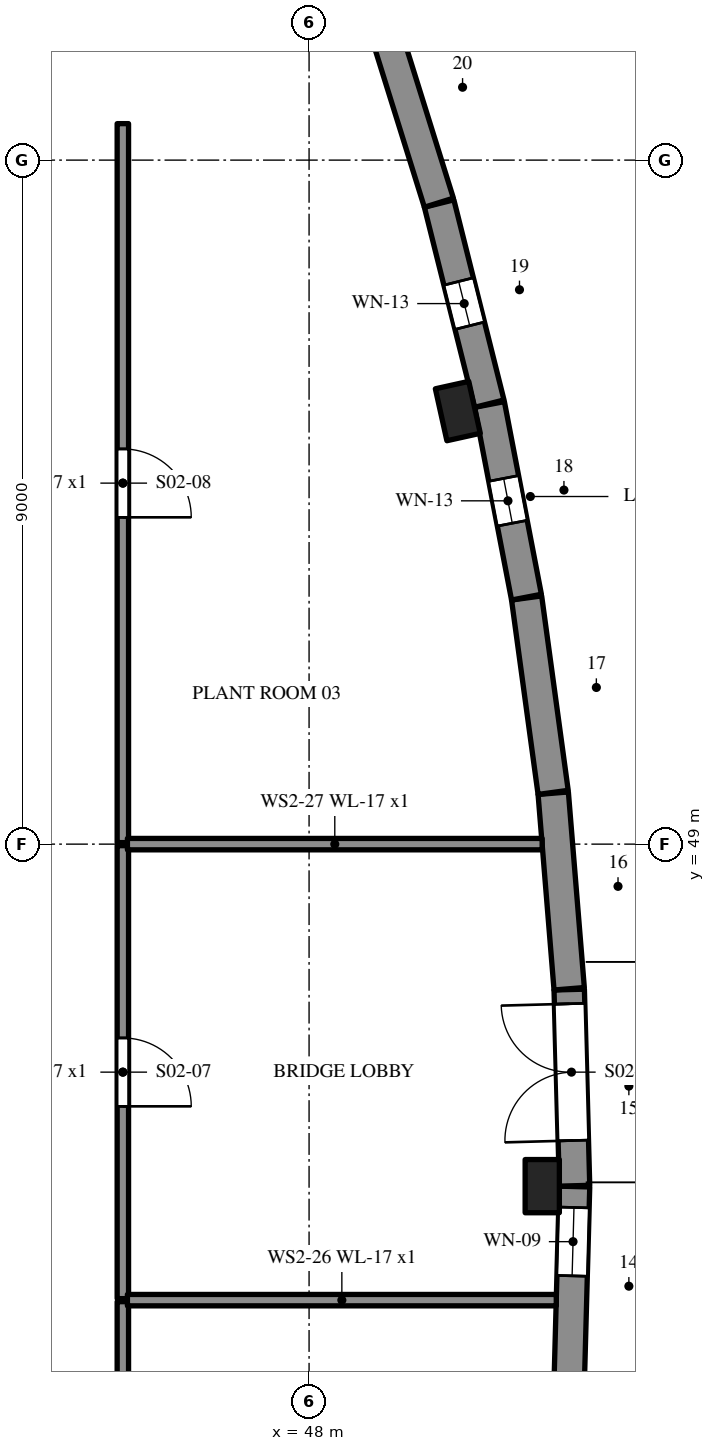
"""IFC4 building model, lengths in metres.
Left out: names, types, materials, properties, quantities, classifications, styles, units other than length and angle.
Written with IfcOpenShell. Run it as: python <this file> out.ifc"""

import sys

from ifc_helpers import new_model, si_unit, direction, frame, frame_2d, origin, origin_2d, place, context, subcontext, project, spatial, polyline, rectangle, outline, extrude, element, fill, save


model = new_model("IFC4")
c1 = context("Model", 3, precision=1e-05, world=origin(), true_north=direction((0.0, 1.0)))
c2 = subcontext(c1, "Body", "Model", "MODEL_VIEW")
j1 = project(units=[si_unit("LENGTHUNIT", "METRE"), si_unit("PLANEANGLEUNIT", "RADIAN")], contexts=[c1])
p1 = place(None, origin())
s1 = spatial("IfcSite", under=j1, at=p1, CompositionType="ELEMENT")
p2 = place(p1, origin())
s2 = spatial("IfcBuilding", under=s1, at=p2, CompositionType="ELEMENT")
p3 = place(p2, frame((0.0, 0.0, 10.2)))
s3 = spatial("IfcBuildingStorey", under=s2, at=p3, CompositionType="ELEMENT", Elevation=10.2)
p4 = place(p3, frame((51.423, 41.914, 0.0), z_axis=(0.0, 0.0, 1.0), x_axis=(0.027139748682, 0.99963164918, 0.0)))
e1 = element("IfcWall", 1, at=p4, inside=s3, PredefinedType="SOLIDWALL", context=c2, shape_type="SweptSolid", body=[
    extrude(outline(polyline([(0.0, 0.0), (2.582, 0.0), (2.582, 3.866), (2.517, 3.843), (0.0, 2.97), (0.0, 0.0)])), frame((0.0, 0.2, 0.0), z_axis=(0.0, -1.0, 0.0), x_axis=(1.0, 0.0, 0.0)), (0.0, 0.0, 1.0), 0.4),
])
p5 = place(p4, frame((1.406, 0.0, 0.9)))
e2 = element("IfcOpeningElement", 2, at=p5, cuts=e1, PredefinedType="OPENING", context=c2, shape_type="SweptSolid", body=[
    extrude(rectangle(XDim=0.9, YDim=1.5, at=frame_2d((0.45, 0.75))), frame((0.0, 0.21, 0.0), z_axis=(0.0, -1.0, 0.0), x_axis=(1.0, 0.0, 0.0)), (0.0, 0.0, 1.0), 0.42),
])
p6 = place(p3, frame((51.493, 44.505, 0.0), z_axis=(0.0, 0.0, 1.0), x_axis=(-0.027139748682, 0.99963164918, 0.0)))
e3 = element("IfcWall", 3, at=p6, inside=s3, PredefinedType="SOLIDWALL", context=c2, shape_type="SweptSolid", body=[
    extrude(outline(polyline([(0.0, 0.0), (2.582, 0.0), (2.582, 2.97), (2.559, 2.978), (0.054, 3.847), (0.0, 3.866), (0.0, 0.0)])), frame((0.0, 0.2, 0.0), z_axis=(0.0, -1.0, 0.0), x_axis=(1.0, 0.0, 0.0)), (0.0, 0.0, 1.0), 0.4),
])
p7 = place(p6, frame((0.595, 0.0, 0.0)))
e4 = element("IfcOpeningElement", 4, at=p7, cuts=e3, PredefinedType="OPENING", context=c2, shape_type="SweptSolid", body=[
    extrude(rectangle(XDim=1.8, YDim=2.1, at=frame_2d((0.9, 1.05))), frame((0.0, 0.21, 0.0), z_axis=(0.0, -1.0, 0.0), x_axis=(1.0, 0.0, 0.0)), (0.0, 0.0, 1.0), 0.42),
])
p8 = place(p3, frame((51.422, 47.097, 0.0), z_axis=(0.0, 0.0, 1.0), x_axis=(-0.081323667998, 0.996687744995, 0.0)))
e5 = element("IfcWall", 5, at=p8, inside=s3, PredefinedType="SOLIDWALL", context=c2, shape_type="SweptSolid", body=[
    extrude(outline(polyline([(0.0, 0.0), (2.582, 0.0), (2.582, 2.065), (2.537, 2.081), (0.0, 2.962), (0.0, 0.0)])), frame((0.0, 0.2, 0.0), z_axis=(0.0, -1.0, 0.0), x_axis=(1.0, 0.0, 0.0)), (0.0, 0.0, 1.0), 0.4),
])
p9 = place(p3, frame((51.211, 49.681, 0.0), z_axis=(0.0, 0.0, 1.0), x_axis=(-0.13522291824, 0.990815200924, 0.0)))
e6 = element("IfcWall", 6, at=p9, inside=s3, PredefinedType="SOLIDWALL", context=c2, shape_type="SweptSolid", body=[
    extrude(outline(polyline([(0.0, 0.0), (2.582, 0.0), (2.582, 2.964), (2.524, 2.945), (0.094, 2.102), (0.0, 2.069), (0.0, 0.0)])), frame((0.0, 0.2, 0.0), z_axis=(0.0, -1.0, 0.0), x_axis=(1.0, 0.0, 0.0)), (0.0, 0.0, 1.0), 0.4),
])
p10 = place(p3, frame((50.86, 52.25, 0.0), z_axis=(0.0, 0.0, 1.0), x_axis=(-0.188763210152, 0.982022632373, 0.0)))
e7 = element("IfcWall", 7, at=p10, inside=s3, PredefinedType="SOLIDWALL", context=c2, shape_type="SweptSolid", body=[
    extrude(outline(polyline([(0.0, 0.0), (2.582, 0.0), (2.581, 3.832), (2.543, 3.854), (2.466, 3.828), (0.07, 2.996), (0.0, 2.972), (0.0, 0.0)])), frame((0.0, 0.2, 0.0), z_axis=(0.0, -1.0, 0.0), x_axis=(1.0, 0.0, 0.0)), (0.0, 0.0, 1.0), 0.4),
])
p11 = place(p10, frame((0.991, 0.0, 2.4)))
e8 = element("IfcOpeningElement", 8, at=p11, cuts=e7, PredefinedType="OPENING", context=c2, shape_type="SweptSolid", body=[
    extrude(rectangle(XDim=0.6, YDim=0.6, at=frame_2d((0.3, 0.3))), frame((0.0, 0.21, 0.0), z_axis=(0.0, -1.0, 0.0), x_axis=(1.0, 0.0, 0.0)), (0.0, 0.0, 1.0), 0.42),
])
p12 = place(p3, frame((50.371, 54.795, 0.0), z_axis=(0.0, 0.0, 1.0), x_axis=(-0.2430011368, 0.970026003525, 0.0)))
e9 = element("IfcWall", 9, at=p12, inside=s3, PredefinedType="SOLIDWALL", context=c2, shape_type="SweptSolid", body=[
    extrude(outline(polyline([(0.0, 0.0), (2.715, 0.0), (2.715, 2.925), (0.128, 3.781), (0.078, 3.797), (0.0, 3.823), (0.0, 0.0)])), frame((0.0, 0.2, 0.0), z_axis=(0.0, -1.0, 0.0), x_axis=(1.0, 0.0, 0.0)), (0.0, 0.0, 1.0), 0.4),
])
p13 = place(p12, frame((1.057, 0.0, 2.4)))
e10 = element("IfcOpeningElement", 10, at=p13, cuts=e9, PredefinedType="OPENING", context=c2, shape_type="SweptSolid", body=[
    extrude(rectangle(XDim=0.6, YDim=0.6, at=frame_2d((0.3, 0.3))), frame((0.0, 0.21, 0.0), z_axis=(0.0, -1.0, 0.0), x_axis=(1.0, 0.0, 0.0)), (0.0, 0.0, 1.0), 0.42),
])
p14 = place(p3, frame((49.708, 57.44, 0.0), z_axis=(0.0, 0.0, 1.0), x_axis=(-0.29795748067, 0.954579142718, 0.0)))
e11 = element("IfcWall", 11, at=p14, inside=s3, PredefinedType="SOLIDWALL", context=c2, shape_type="SweptSolid", body=[
    extrude(outline(polyline([(0.0, 0.0), (2.715, 0.0), (2.714, 2.02), (2.703, 2.023), (0.0, 2.916), (0.0, 0.0)])), frame((0.0, 0.2, 0.0), z_axis=(0.0, -1.0, 0.0), x_axis=(1.0, 0.0, 0.0)), (0.0, 0.0, 1.0), 0.4),
])
p15 = place(p3, frame((51.068, 44.5, 0.0), z_axis=(0.0, 0.0, 1.0), x_axis=(0.0, 1.0, 0.0)))
e12 = element("IfcColumn", 12, at=p15, inside=s3, PredefinedType="PILASTER", context=c2, shape_type="SweptSolid", body=[
    extrude(rectangle(XDim=0.7, YDim=0.45, at=origin_2d()), origin(), (0.0, 0.0, 1.0), 3.967),
])
p16 = place(p3, frame((49.957, 54.698, 0.0), z_axis=(0.0, 0.0, 1.0), x_axis=(-0.216640755448, 0.976251393381, 0.0)))
e13 = element("IfcColumn", 13, at=p16, inside=s3, PredefinedType="PILASTER", context=c2, shape_type="SweptSolid", body=[
    extrude(rectangle(XDim=0.7, YDim=0.45, at=origin_2d()), origin(), (0.0, 0.0, 1.0), 3.953),
])
p17 = place(p3, frame((45.55, 42.98, 0.0), z_axis=(0.0, 0.0, 1.0), x_axis=(0.0, -1.0, 0.0)))
e14 = element("IfcWall", 14, at=p17, inside=s3, PredefinedType="PARTITIONING", context=c2, shape_type="SweptSolid", body=[
    extrude(rectangle(XDim=6.46, YDim=0.15, at=frame_2d((3.23, 0.0))), origin(), (0.0, 0.0, 1.0), 2.4),
])
p18 = place(p17, frame((2.78, 0.0, 0.0)))
e15 = element("IfcOpeningElement", 15, at=p18, cuts=e14, PredefinedType="OPENING", context=c2, shape_type="SweptSolid", body=[
    extrude(rectangle(XDim=0.9, YDim=2.1, at=frame_2d((0.45, 1.05))), frame((0.0, 0.085, 0.0), z_axis=(0.0, -1.0, 0.0), x_axis=(1.0, 0.0, 0.0)), (0.0, 0.0, 1.0), 0.17),
])
p19 = place(p3, frame((45.55, 48.98, 0.0), z_axis=(0.0, 0.0, 1.0), x_axis=(0.0, -1.0, 0.0)))
e16 = element("IfcWall", 16, at=p19, inside=s3, PredefinedType="PARTITIONING", context=c2, shape_type="SweptSolid", body=[
    extrude(rectangle(XDim=5.96, YDim=0.15, at=frame_2d((2.98, 0.0))), origin(), (0.0, 0.0, 1.0), 2.4),
])
p20 = place(p19, frame((2.53, 0.0, 0.0)))
e17 = element("IfcOpeningElement", 17, at=p20, cuts=e16, PredefinedType="OPENING", context=c2, shape_type="SweptSolid", body=[
    extrude(rectangle(XDim=0.9, YDim=2.1, at=frame_2d((0.45, 1.05))), frame((0.0, 0.085, 0.0), z_axis=(0.0, -1.0, 0.0), x_axis=(1.0, 0.0, 0.0)), (0.0, 0.0, 1.0), 0.17),
])
p21 = place(p3, frame((45.55, 58.48, 0.0), z_axis=(0.0, 0.0, 1.0), x_axis=(0.0, -1.0, 0.0)))
e18 = element("IfcWall", 18, at=p21, inside=s3, PredefinedType="PARTITIONING", context=c2, shape_type="SweptSolid", body=[
    extrude(rectangle(XDim=9.46, YDim=0.15, at=frame_2d((4.73, 0.0))), origin(), (0.0, 0.0, 1.0), 2.4),
])
p22 = place(p21, frame((4.28, 0.0, 0.0)))
e19 = element("IfcOpeningElement", 19, at=p22, cuts=e18, PredefinedType="OPENING", context=c2, shape_type="SweptSolid", body=[
    extrude(rectangle(XDim=0.9, YDim=2.1, at=frame_2d((0.45, 1.05))), frame((0.0, 0.085, 0.0), z_axis=(0.0, -1.0, 0.0), x_axis=(1.0, 0.0, 0.0)), (0.0, 0.0, 1.0), 0.17),
])
p23 = place(p3, frame((45.61, 43.0, 0.0), z_axis=(0.0, 0.0, 1.0), x_axis=(1.0, 0.0, 0.0)))
e20 = element("IfcWall", 20, at=p23, inside=s3, PredefinedType="PARTITIONING", context=c2, shape_type="SweptSolid", body=[
    extrude(rectangle(XDim=5.642, YDim=0.15, at=frame_2d((2.821, 0.0))), origin(), (0.0, 0.0, 1.0), 2.4),
])
p24 = place(p3, frame((45.61, 49.0, 0.0), z_axis=(0.0, 0.0, 1.0), x_axis=(1.0, 0.0, 0.0)))
e21 = element("IfcWall", 21, at=p24, inside=s3, PredefinedType="PARTITIONING", context=c2, shape_type="SweptSolid", body=[
    extrude(rectangle(XDim=5.457, YDim=0.15, at=frame_2d((2.728, 0.0))), origin(), (0.0, 0.0, 1.0), 2.4),
])
p25 = place(p7, origin())
e22 = element("IfcDoor", 22, at=p25, inside=s3, OperationType="DOUBLE_DOOR_SINGLE_SWING", PredefinedType="DOOR", context=c2, shape_type="SweptSolid", body=[
    extrude(rectangle(XDim=1.8, YDim=2.1, at=frame_2d((0.9, 1.05))), frame((0.0, 0.025, 0.0), z_axis=(0.0, -1.0, 0.0), x_axis=(1.0, 0.0, 0.0)), (0.0, 0.0, 1.0), 0.05),
])
fill(e4, e22)
p26 = place(p5, origin())
e23 = element("IfcWindow", 23, at=p26, inside=s3, PartitioningType="SINGLE_PANEL", PredefinedType="WINDOW", context=c2, shape_type="SweptSolid", body=[
    extrude(rectangle(XDim=0.9, YDim=1.5, at=frame_2d((0.45, 0.75))), frame((0.0, 0.03, 0.0), z_axis=(0.0, -1.0, 0.0), x_axis=(1.0, 0.0, 0.0)), (0.0, 0.0, 1.0), 0.06),
])
fill(e2, e23)
p27 = place(p11, origin())
e24 = element("IfcWindow", 24, at=p27, inside=s3, PartitioningType="SINGLE_PANEL", PredefinedType="WINDOW", context=c2, shape_type="SweptSolid", body=[
    extrude(rectangle(XDim=0.6, YDim=0.6, at=frame_2d((0.3, 0.3))), frame((0.0, 0.03, 0.0), z_axis=(0.0, -1.0, 0.0), x_axis=(1.0, 0.0, 0.0)), (0.0, 0.0, 1.0), 0.06),
])
fill(e8, e24)
p28 = place(p13, origin())
e25 = element("IfcWindow", 25, at=p28, inside=s3, PartitioningType="SINGLE_PANEL", PredefinedType="WINDOW", context=c2, shape_type="SweptSolid", body=[
    extrude(rectangle(XDim=0.6, YDim=0.6, at=frame_2d((0.3, 0.3))), frame((0.0, 0.03, 0.0), z_axis=(0.0, -1.0, 0.0), x_axis=(1.0, 0.0, 0.0)), (0.0, 0.0, 1.0), 0.06),
])
fill(e10, e25)
p29 = place(p20, origin())
e26 = element("IfcDoor", 26, at=p29, inside=s3, OperationType="SINGLE_SWING_RIGHT", PredefinedType="DOOR", context=c2, shape_type="SweptSolid", body=[
    extrude(rectangle(XDim=0.9, YDim=2.1, at=frame_2d((0.45, 1.05))), frame((0.0, 0.025, 0.0), z_axis=(0.0, -1.0, 0.0), x_axis=(1.0, 0.0, 0.0)), (0.0, 0.0, 1.0), 0.05),
])
fill(e17, e26)
p30 = place(p22, origin())
e27 = element("IfcDoor", 27, at=p30, inside=s3, OperationType="SINGLE_SWING_RIGHT", PredefinedType="DOOR", context=c2, shape_type="SweptSolid", body=[
    extrude(rectangle(XDim=0.9, YDim=2.1, at=frame_2d((0.45, 1.05))), frame((0.0, 0.025, 0.0), z_axis=(0.0, -1.0, 0.0), x_axis=(1.0, 0.0, 0.0)), (0.0, 0.0, 1.0), 0.05),
])
fill(e19, e27)
save(model, sys.argv[1])
